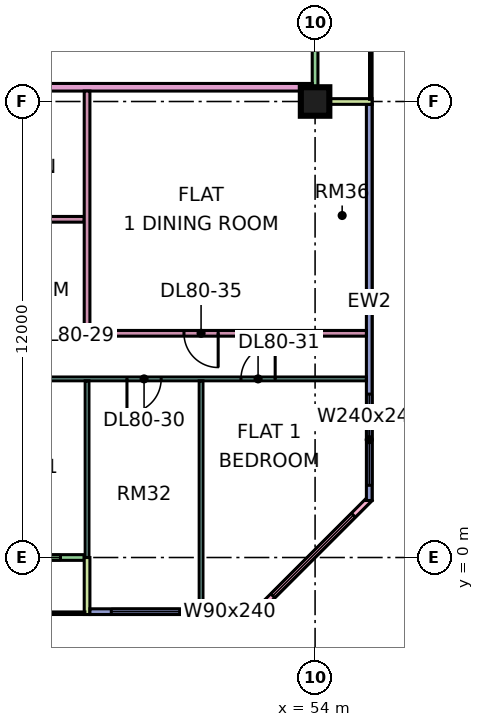
"""IFC4 building model, lengths in metres.
Left out: names, types, materials, properties, quantities, classifications, styles, units other than length and angle.
Written with IfcOpenShell. Run it as: python <this file> out.ifc"""

import sys

from ifc_helpers import new_model, si_unit, direction, frame, frame_2d, origin, origin_2d, place, context, subcontext, project, spatial, rectangle, extrude, element, fill, save


model = new_model("IFC4")
c1 = context("Model", 3, precision=1e-05, world=origin(), true_north=direction((0.0, 1.0)))
c2 = subcontext(c1, "Body", "Model", "MODEL_VIEW")
j1 = project(units=[si_unit("LENGTHUNIT", "METRE"), si_unit("PLANEANGLEUNIT", "RADIAN")], contexts=[c1])
p1 = place(None, origin())
s1 = spatial("IfcSite", under=j1, at=p1, CompositionType="ELEMENT")
p2 = place(p1, origin())
s2 = spatial("IfcBuilding", under=s1, at=p2, CompositionType="ELEMENT")
p3 = place(p2, frame((0.0, 0.0, 346.4)))
s3 = spatial("IfcBuildingStorey", under=s2, at=p3, CompositionType="ELEMENT", Elevation=346.4)
p4 = place(p3, frame((54.0, 12.0, 0.0), z_axis=(0.0, 0.0, 1.0), x_axis=(1.0, 0.0, 0.0)))
e1 = element("IfcColumn", 1, at=p4, inside=s3, PredefinedType="COLUMN", context=c2, shape_type="SweptSolid", body=[
    extrude(rectangle(XDim=0.75, YDim=0.75, at=origin_2d()), origin(), (0.0, 0.0, 1.0), 3.75),
])
p5 = place(p3, frame((36.075, 0.0, 0.0), z_axis=(0.0, 0.0, 1.0), x_axis=(1.0, 0.0, 0.0)))
e2 = element("IfcWall", 2, at=p5, inside=s3, PredefinedType="SOLIDWALL", context=c2, shape_type="SweptSolid", body=[
    extrude(rectangle(XDim=11.85, YDim=0.15, at=frame_2d((5.925, 0.0))), origin(), (0.0, 0.0, 1.0), 3.35),
])
p6 = place(p5, frame((3.525, 0.0, 0.0)))
e3 = element("IfcOpeningElement", 3, at=p6, cuts=e2, PredefinedType="OPENING", context=c2, shape_type="SweptSolid", body=[
    extrude(rectangle(XDim=1.8, YDim=2.4, at=frame_2d((0.9, 1.2))), frame((0.0, 0.085, 0.0), z_axis=(0.0, -1.0, 0.0), x_axis=(1.0, 0.0, 0.0)), (0.0, 0.0, 1.0), 0.17),
])
p7 = place(p5, frame((10.025, 0.0, 0.45)))
e4 = element("IfcOpeningElement", 4, at=p7, cuts=e2, PredefinedType="OPENING", context=c2, shape_type="SweptSolid", body=[
    extrude(rectangle(XDim=1.2, YDim=2.4, at=frame_2d((0.6, 1.2))), frame((0.0, 0.085, 0.0), z_axis=(0.0, -1.0, 0.0), x_axis=(1.0, 0.0, 0.0)), (0.0, 0.0, 1.0), 0.17),
])
p8 = place(p3, frame((48.0, -1.5, 0.0), z_axis=(0.0, 0.0, 1.0), x_axis=(0.0, 1.0, 0.0)))
e5 = element("IfcWall", 5, at=p8, inside=s3, PredefinedType="SOLIDWALL", context=c2, shape_type="SweptSolid", body=[
    extrude(rectangle(XDim=1.5, YDim=0.15, at=frame_2d((0.75, 0.0))), origin(), (0.0, 0.0, 1.0), 3.35),
])
p9 = place(p3, frame((48.075, -1.425, 0.0), z_axis=(0.0, 0.0, 1.0), x_axis=(1.0, 0.0, 0.0)))
e6 = element("IfcWall", 6, at=p9, inside=s3, PredefinedType="SOLIDWALL", context=c2, shape_type="SweptSolid", body=[
    extrude(rectangle(XDim=4.425, YDim=0.15, at=frame_2d((2.212, 0.0))), origin(), (0.0, 0.0, 1.0), 3.35),
])
p10 = place(p9, frame((0.562, 0.0, 0.45)))
e7 = element("IfcOpeningElement", 7, at=p10, cuts=e6, PredefinedType="OPENING", context=c2, shape_type="SweptSolid", body=[
    extrude(rectangle(XDim=1.8, YDim=2.4, at=frame_2d((0.9, 1.2))), frame((0.0, 0.085, 0.0), z_axis=(0.0, -1.0, 0.0), x_axis=(1.0, 0.0, 0.0)), (0.0, 0.0, 1.0), 0.17),
])
p11 = place(p9, frame((3.225, 0.0, 0.45)))
e8 = element("IfcOpeningElement", 8, at=p11, cuts=e6, PredefinedType="OPENING", context=c2, shape_type="SweptSolid", body=[
    extrude(rectangle(XDim=0.9, YDim=2.4, at=frame_2d((0.45, 1.2))), frame((0.0, 0.085, 0.0), z_axis=(0.0, -1.0, 0.0), x_axis=(1.0, 0.0, 0.0)), (0.0, 0.0, 1.0), 0.17),
])
p12 = place(p3, frame((52.447, -1.447, 0.0), z_axis=(0.0, 0.0, 1.0), x_axis=(0.707106781187, 0.707106781187, 0.0)))
e9 = element("IfcWall", 9, at=p12, inside=s3, PredefinedType="SOLIDWALL", context=c2, shape_type="SweptSolid", body=[
    extrude(rectangle(XDim=4.243, YDim=0.15, at=frame_2d((2.121, 0.0))), origin(), (0.0, 0.0, 1.0), 3.35),
])
p13 = place(p12, frame((0.621, 0.0, 0.45)))
e10 = element("IfcOpeningElement", 10, at=p13, cuts=e9, PredefinedType="OPENING", context=c2, shape_type="SweptSolid", body=[
    extrude(rectangle(XDim=3.0, YDim=2.4, at=frame_2d((1.5, 1.2))), frame((0.0, 0.085, 0.0), z_axis=(0.0, -1.0, 0.0), x_axis=(1.0, 0.0, 0.0)), (0.0, 0.0, 1.0), 0.17),
])
p14 = place(p3, frame((55.425, 1.5, 0.0), z_axis=(0.0, 0.0, 1.0), x_axis=(0.0, 1.0, 0.0)))
e11 = element("IfcWall", 11, at=p14, inside=s3, PredefinedType="SOLIDWALL", context=c2, shape_type="SweptSolid", body=[
    extrude(rectangle(XDim=10.425, YDim=0.15, at=frame_2d((5.212, 0.0))), origin(), (0.0, 0.0, 1.0), 3.35),
])
p15 = place(p14, frame((0.4, 0.0, 0.45)))
e12 = element("IfcOpeningElement", 12, at=p15, cuts=e11, PredefinedType="OPENING", context=c2, shape_type="SweptSolid", body=[
    extrude(rectangle(XDim=2.4, YDim=2.4, at=frame_2d((1.2, 1.2))), frame((0.0, 0.085, 0.0), z_axis=(0.0, -1.0, 0.0), x_axis=(1.0, 0.0, 0.0)), (0.0, 0.0, 1.0), 0.17),
])
p16 = place(p3, frame((54.0, 12.075, 0.0), z_axis=(0.0, 0.0, 1.0), x_axis=(0.0, 1.0, 0.0)))
e13 = element("IfcWall", 13, at=p16, inside=s3, PredefinedType="SOLIDWALL", context=c2, shape_type="SweptSolid", body=[
    extrude(rectangle(XDim=10.35, YDim=0.15, at=frame_2d((5.175, 0.0))), origin(), (0.0, 0.0, 1.0), 3.35),
])
p17 = place(p16, frame((4.538, 0.0, 0.45)))
e14 = element("IfcOpeningElement", 14, at=p17, cuts=e13, PredefinedType="OPENING", context=c2, shape_type="SweptSolid", body=[
    extrude(rectangle(XDim=4.8, YDim=2.4, at=frame_2d((2.4, 1.2))), frame((0.0, 0.085, 0.0), z_axis=(0.0, -1.0, 0.0), x_axis=(1.0, 0.0, 0.0)), (0.0, 0.0, 1.0), 0.17),
])
p18 = place(p3, frame((55.5, 12.0, 0.0), z_axis=(0.0, 0.0, 1.0), x_axis=(-1.0, 0.0, 0.0)))
e15 = element("IfcWall", 15, at=p18, inside=s3, PredefinedType="SOLIDWALL", context=c2, shape_type="SweptSolid", body=[
    extrude(rectangle(XDim=1.5, YDim=0.15, at=frame_2d((0.75, 0.0))), origin(), (0.0, 0.0, 1.0), 3.35),
])
p19 = place(p3, frame((33.05, 4.7, 0.0), z_axis=(0.0, 0.0, 1.0), x_axis=(1.0, 0.0, 0.0)))
e16 = element("IfcWall", 16, at=p19, inside=s3, PredefinedType="PARTITIONING", context=c2, shape_type="SweptSolid", body=[
    extrude(rectangle(XDim=22.301, YDim=0.1, at=frame_2d((11.15, 0.0))), origin(), (0.0, 0.0, 1.0), 3.35),
])
p20 = place(p19, frame((1.0, 0.0, 0.0)))
e17 = element("IfcOpeningElement", 17, at=p20, cuts=e16, PredefinedType="OPENING", context=c2, shape_type="SweptSolid", body=[
    extrude(rectangle(XDim=0.9, YDim=2.1, at=frame_2d((0.45, 1.05))), frame((0.0, 0.06, 0.0), z_axis=(0.0, -1.0, 0.0), x_axis=(1.0, 0.0, 0.0)), (0.0, 0.0, 1.0), 0.12),
])
p21 = place(p19, frame((13.0, 0.0, 0.0)))
e18 = element("IfcOpeningElement", 18, at=p21, cuts=e16, PredefinedType="OPENING", context=c2, shape_type="SweptSolid", body=[
    extrude(rectangle(XDim=0.9, YDim=2.1, at=frame_2d((0.45, 1.05))), frame((0.0, 0.06, 0.0), z_axis=(0.0, -1.0, 0.0), x_axis=(1.0, 0.0, 0.0)), (0.0, 0.0, 1.0), 0.12),
])
p22 = place(p19, frame((16.0, 0.0, 0.0)))
e19 = element("IfcOpeningElement", 19, at=p22, cuts=e16, PredefinedType="OPENING", context=c2, shape_type="SweptSolid", body=[
    extrude(rectangle(XDim=0.9, YDim=2.1, at=frame_2d((0.45, 1.05))), frame((0.0, 0.06, 0.0), z_axis=(0.0, -1.0, 0.0), x_axis=(1.0, 0.0, 0.0)), (0.0, 0.0, 1.0), 0.12),
])
p23 = place(p19, frame((19.0, 0.0, 0.0)))
e20 = element("IfcOpeningElement", 20, at=p23, cuts=e16, PredefinedType="OPENING", context=c2, shape_type="SweptSolid", body=[
    extrude(rectangle(XDim=0.9, YDim=2.1, at=frame_2d((0.45, 1.05))), frame((0.0, 0.06, 0.0), z_axis=(0.0, -1.0, 0.0), x_axis=(1.0, 0.0, 0.0)), (0.0, 0.0, 1.0), 0.12),
])
p24 = place(p19, frame((7.0, 0.0, 0.0)))
e21 = element("IfcOpeningElement", 21, at=p24, cuts=e16, PredefinedType="OPENING", context=c2, shape_type="SweptSolid", body=[
    extrude(rectangle(XDim=0.9, YDim=2.1, at=frame_2d((0.45, 1.05))), frame((0.0, 0.06, 0.0), z_axis=(0.0, -1.0, 0.0), x_axis=(1.0, 0.0, 0.0)), (0.0, 0.0, 1.0), 0.12),
])
p25 = place(p3, frame((40.65, 12.375, 0.0), z_axis=(0.0, 0.0, 1.0), x_axis=(1.0, 0.0, 0.0)))
e22 = element("IfcWall", 22, at=p25, inside=s3, PredefinedType="PARTITIONING", context=c2, shape_type="SweptSolid", body=[
    extrude(rectangle(XDim=13.276, YDim=0.2, at=frame_2d((6.638, 0.0))), origin(), (0.0, 0.0, 1.0), 3.35),
])
p26 = place(p25, frame((1.05, 0.0, 0.0)))
e23 = element("IfcOpeningElement", 23, at=p26, cuts=e22, PredefinedType="OPENING", context=c2, shape_type="SweptSolid", body=[
    extrude(rectangle(XDim=1.0, YDim=2.1, at=frame_2d((0.5, 1.05))), frame((0.0, 0.11, 0.0), z_axis=(0.0, -1.0, 0.0), x_axis=(1.0, 0.0, 0.0)), (0.0, 0.0, 1.0), 0.22),
])
p27 = place(p3, frame((43.575, 5.9, 0.0), z_axis=(0.0, 0.0, 1.0), x_axis=(1.0, 0.0, 0.0)))
e24 = element("IfcWall", 24, at=p27, inside=s3, PredefinedType="PARTITIONING", context=c2, shape_type="SweptSolid", body=[
    extrude(rectangle(XDim=11.775, YDim=0.15, at=frame_2d((5.888, 0.0))), origin(), (0.0, 0.0, 1.0), 3.35),
])
p28 = place(p27, frame((1.825, 0.0, 0.0)))
e25 = element("IfcOpeningElement", 25, at=p28, cuts=e24, PredefinedType="OPENING", context=c2, shape_type="SweptSolid", body=[
    extrude(rectangle(XDim=0.8, YDim=2.1, at=frame_2d((0.4, 1.05))), frame((0.0, 0.085, 0.0), z_axis=(0.0, -1.0, 0.0), x_axis=(1.0, 0.0, 0.0)), (0.0, 0.0, 1.0), 0.17),
])
p29 = place(p27, frame((6.975, 0.0, 0.0)))
e26 = element("IfcOpeningElement", 26, at=p29, cuts=e24, PredefinedType="OPENING", context=c2, shape_type="SweptSolid", body=[
    extrude(rectangle(XDim=0.9, YDim=2.1, at=frame_2d((0.45, 1.05))), frame((0.0, 0.085, 0.0), z_axis=(0.0, -1.0, 0.0), x_axis=(1.0, 0.0, 0.0)), (0.0, 0.0, 1.0), 0.17),
])
p30 = place(p3, frame((43.725, 8.9, 0.0), z_axis=(0.0, 0.0, 1.0), x_axis=(1.0, 0.0, 0.0)))
e27 = element("IfcWall", 27, at=p30, inside=s3, PredefinedType="PARTITIONING", context=c2, shape_type="SweptSolid", body=[
    extrude(rectangle(XDim=4.2, YDim=0.15, at=frame_2d((2.1, 0.0))), origin(), (0.0, 0.0, 1.0), 3.35),
])
p31 = place(p3, frame((48.0, 0.0, 0.0), z_axis=(0.0, 0.0, 1.0), x_axis=(0.0, 1.0, 0.0)))
e28 = element("IfcWall", 28, at=p31, inside=s3, PredefinedType="PARTITIONING", context=c2, shape_type="SweptSolid", body=[
    extrude(rectangle(XDim=4.65, YDim=0.1, at=frame_2d((2.325, 0.0))), origin(), (0.0, 0.0, 1.0), 3.35),
])
p32 = place(p3, frame((48.0, 5.975, 0.0), z_axis=(0.0, 0.0, 1.0), x_axis=(0.0, 1.0, 0.0)))
e29 = element("IfcWall", 29, at=p32, inside=s3, PredefinedType="PARTITIONING", context=c2, shape_type="SweptSolid", body=[
    extrude(rectangle(XDim=6.3, YDim=0.15, at=frame_2d((3.15, 0.0))), origin(), (0.0, 0.0, 1.0), 3.35),
])
p33 = place(p3, frame((51.0, -1.351, 0.0), z_axis=(0.0, 0.0, 1.0), x_axis=(0.0, 1.0, 0.0)))
e30 = element("IfcWall", 30, at=p33, inside=s3, PredefinedType="PARTITIONING", context=c2, shape_type="SweptSolid", body=[
    extrude(rectangle(XDim=6.001, YDim=0.1, at=frame_2d((3.0, 0.0))), origin(), (0.0, 0.0, 1.0), 3.35),
])
p34 = place(p7, origin())
e31 = element("IfcWindow", 31, at=p34, inside=s3, PartitioningType="SINGLE_PANEL", PredefinedType="WINDOW", context=c2, shape_type="SweptSolid", body=[
    extrude(rectangle(XDim=1.2, YDim=2.4, at=frame_2d((0.6, 1.2))), frame((0.0, 0.03, 0.0), z_axis=(0.0, -1.0, 0.0), x_axis=(1.0, 0.0, 0.0)), (0.0, 0.0, 1.0), 0.06),
])
fill(e4, e31)
p35 = place(p10, origin())
e32 = element("IfcWindow", 32, at=p35, inside=s3, PartitioningType="SINGLE_PANEL", PredefinedType="WINDOW", context=c2, shape_type="SweptSolid", body=[
    extrude(rectangle(XDim=1.8, YDim=2.4, at=frame_2d((0.9, 1.2))), frame((0.0, 0.03, 0.0), z_axis=(0.0, -1.0, 0.0), x_axis=(1.0, 0.0, 0.0)), (0.0, 0.0, 1.0), 0.06),
])
fill(e7, e32)
p36 = place(p11, origin())
e33 = element("IfcWindow", 33, at=p36, inside=s3, PartitioningType="SINGLE_PANEL", PredefinedType="WINDOW", context=c2, shape_type="SweptSolid", body=[
    extrude(rectangle(XDim=0.9, YDim=2.4, at=frame_2d((0.45, 1.2))), frame((0.0, 0.03, 0.0), z_axis=(0.0, -1.0, 0.0), x_axis=(1.0, 0.0, 0.0)), (0.0, 0.0, 1.0), 0.06),
])
fill(e8, e33)
p37 = place(p13, origin())
e34 = element("IfcWindow", 34, at=p37, inside=s3, PartitioningType="SINGLE_PANEL", PredefinedType="WINDOW", context=c2, shape_type="SweptSolid", body=[
    extrude(rectangle(XDim=3.0, YDim=2.4, at=frame_2d((1.5, 1.2))), frame((0.0, 0.03, 0.0), z_axis=(0.0, -1.0, 0.0), x_axis=(1.0, 0.0, 0.0)), (0.0, 0.0, 1.0), 0.06),
])
fill(e10, e34)
p38 = place(p15, origin())
e35 = element("IfcWindow", 35, at=p38, inside=s3, PartitioningType="SINGLE_PANEL", PredefinedType="WINDOW", context=c2, shape_type="SweptSolid", body=[
    extrude(rectangle(XDim=2.4, YDim=2.4, at=frame_2d((1.2, 1.2))), frame((0.0, 0.03, 0.0), z_axis=(0.0, -1.0, 0.0), x_axis=(1.0, 0.0, 0.0)), (0.0, 0.0, 1.0), 0.06),
])
fill(e12, e35)
p39 = place(p22, frame((0.9, 0.0, 0.0), z_axis=(0.0, 0.0, 1.0), x_axis=(-1.0, 0.0, 0.0)))
e36 = element("IfcDoor", 36, at=p39, inside=s3, OperationType="SINGLE_SWING_LEFT", PredefinedType="DOOR", context=c2, shape_type="SweptSolid", body=[
    extrude(rectangle(XDim=0.9, YDim=2.1, at=frame_2d((0.45, 1.05))), frame((0.0, 0.025, 0.0), z_axis=(0.0, -1.0, 0.0), x_axis=(1.0, 0.0, 0.0)), (0.0, 0.0, 1.0), 0.05),
])
fill(e19, e36)
p40 = place(p23, frame((0.9, 0.0, 0.0), z_axis=(0.0, 0.0, 1.0), x_axis=(-1.0, 0.0, 0.0)))
e37 = element("IfcDoor", 37, at=p40, inside=s3, OperationType="SINGLE_SWING_RIGHT", PredefinedType="DOOR", context=c2, shape_type="SweptSolid", body=[
    extrude(rectangle(XDim=0.9, YDim=2.1, at=frame_2d((0.45, 1.05))), frame((0.0, 0.025, 0.0), z_axis=(0.0, -1.0, 0.0), x_axis=(1.0, 0.0, 0.0)), (0.0, 0.0, 1.0), 0.05),
])
fill(e20, e37)
p41 = place(p29, origin())
e38 = element("IfcDoor", 38, at=p41, inside=s3, OperationType="SINGLE_SWING_RIGHT", PredefinedType="DOOR", context=c2, shape_type="SweptSolid", body=[
    extrude(rectangle(XDim=0.9, YDim=2.1, at=frame_2d((0.45, 1.05))), frame((0.0, 0.025, 0.0), z_axis=(0.0, -1.0, 0.0), x_axis=(1.0, 0.0, 0.0)), (0.0, 0.0, 1.0), 0.05),
])
fill(e26, e38)
save(model, sys.argv[1])
